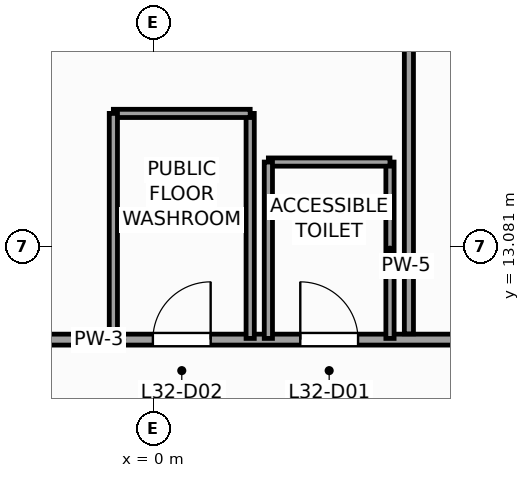
"""IFC4 building model, lengths in metres.
Left out: names, types, materials, properties, quantities, classifications, styles, units other than length and angle.
Written with IfcOpenShell. Run it as: python <this file> out.ifc"""

import sys

from ifc_helpers import new_model, si_unit, direction, frame, frame_2d, origin, place, context, subcontext, project, spatial, rectangle, extrude, source, transform, mapped, element, fill, save


model = new_model("IFC4")
c1 = context("Model", 3, precision=1e-05, world=origin(), true_north=direction((0.0, 1.0)))
c2 = subcontext(c1, "Body", "Model", "MODEL_VIEW")
j1 = project(units=[si_unit("LENGTHUNIT", "METRE"), si_unit("PLANEANGLEUNIT", "RADIAN")], contexts=[c1])
p1 = place(None, origin())
s1 = spatial("IfcSite", under=j1, at=p1, CompositionType="ELEMENT")
p2 = place(p1, origin())
s2 = spatial("IfcBuilding", under=s1, at=p2, CompositionType="ELEMENT")
p3 = place(p2, frame((0.0, 0.0, 135.2)))
s3 = spatial("IfcBuildingStorey", under=s2, at=p3, CompositionType="ELEMENT", Elevation=135.2)
p4 = place(p3, frame((-12.6, 11.55, 0.0), z_axis=(0.0, 0.0, 1.0), x_axis=(1.0, 0.0, 0.0)))
e1 = element("IfcWall", 1, at=p4, inside=s3, PredefinedType="PARTITIONING", context=c2, shape_type="SweptSolid", body=[
    extrude(rectangle(XDim=24.15, YDim=0.18, at=frame_2d((12.075, 0.0))), origin(), (0.0, 0.0, 1.0), 3.6),
])
p5 = place(p4, frame((15.014, 0.0, 0.0)))
e2 = element("IfcOpeningElement", 2, at=p5, cuts=e1, PredefinedType="OPENING", context=c2, shape_type="SweptSolid", body=[
    extrude(rectangle(XDim=0.95, YDim=2.1, at=frame_2d((0.475, 1.05))), frame((0.0, 0.1, 0.0), z_axis=(0.0, -1.0, 0.0), x_axis=(1.0, 0.0, 0.0)), (0.0, 0.0, 1.0), 0.2),
])
p6 = place(p4, frame((12.59, 0.0, 0.0)))
e3 = element("IfcOpeningElement", 3, at=p6, cuts=e1, PredefinedType="OPENING", context=c2, shape_type="SweptSolid", body=[
    extrude(rectangle(XDim=0.95, YDim=2.1, at=frame_2d((0.475, 1.05))), frame((0.0, 0.1, 0.0), z_axis=(0.0, -1.0, 0.0), x_axis=(1.0, 0.0, 0.0)), (0.0, 0.0, 1.0), 0.2),
])
p7 = place(p3, frame((4.2, 11.645, 0.0), z_axis=(0.0, 0.0, 1.0), x_axis=(0.0, 1.0, 0.0)))
e4 = element("IfcWall", 4, at=p7, inside=s3, PredefinedType="PARTITIONING", context=c2, shape_type="SweptSolid", body=[
    extrude(rectangle(XDim=17.805, YDim=0.15, at=frame_2d((8.902, 0.0))), origin(), (0.0, 0.0, 1.0), 3.6),
])
p8 = place(p3, frame((3.889, 11.57, 0.0), z_axis=(0.0, 0.0, 1.0), x_axis=(0.0, 1.0, 0.0)))
e5 = element("IfcWall", 5, at=p8, inside=s3, PredefinedType="PARTITIONING", context=c2, shape_type="SweptSolid", body=[
    extrude(rectangle(XDim=2.9, YDim=0.135, at=frame_2d((1.45, 0.0))), origin(), (0.0, 0.0, 1.0), 3.6),
])
p9 = place(p3, frame((1.889, 14.47, 0.0), z_axis=(0.0, 0.0, 1.0), x_axis=(1.0, 0.0, 0.0)))
e6 = element("IfcWall", 6, at=p9, inside=s3, PredefinedType="PARTITIONING", context=c2, shape_type="SweptSolid", body=[
    extrude(rectangle(XDim=2.0, YDim=0.135, at=frame_2d((1.0, 0.0))), origin(), (0.0, 0.0, 1.0), 3.6),
])
p10 = place(p3, frame((1.889, 11.57, 0.0), z_axis=(0.0, 0.0, 1.0), x_axis=(0.0, 1.0, 0.0)))
e7 = element("IfcWall", 7, at=p10, inside=s3, PredefinedType="PARTITIONING", context=c2, shape_type="SweptSolid", body=[
    extrude(rectangle(XDim=2.9, YDim=0.135, at=frame_2d((1.45, 0.0))), origin(), (0.0, 0.0, 1.0), 3.6),
])
p11 = place(p3, frame((1.59, 11.57, 0.0), z_axis=(0.0, 0.0, 1.0), x_axis=(0.0, 1.0, 0.0)))
e8 = element("IfcWall", 8, at=p11, inside=s3, PredefinedType="PARTITIONING", context=c2, shape_type="SweptSolid", body=[
    extrude(rectangle(XDim=3.7, YDim=0.135, at=frame_2d((1.85, 0.0))), origin(), (0.0, 0.0, 1.0), 3.6),
])
p12 = place(p3, frame((-0.66, 15.27, 0.0), z_axis=(0.0, 0.0, 1.0), x_axis=(1.0, 0.0, 0.0)))
e9 = element("IfcWall", 9, at=p12, inside=s3, PredefinedType="PARTITIONING", context=c2, shape_type="SweptSolid", body=[
    extrude(rectangle(XDim=2.25, YDim=0.135, at=frame_2d((1.125, 0.0))), origin(), (0.0, 0.0, 1.0), 3.6),
])
p13 = place(p3, frame((-0.66, 11.57, 0.0), z_axis=(0.0, 0.0, 1.0), x_axis=(0.0, 1.0, 0.0)))
e10 = element("IfcWall", 10, at=p13, inside=s3, PredefinedType="PARTITIONING", context=c2, shape_type="SweptSolid", body=[
    extrude(rectangle(XDim=3.7, YDim=0.135, at=frame_2d((1.85, 0.0))), origin(), (0.0, 0.0, 1.0), 3.6),
])
m1 = source(origin(), c2, "Body", "SweptSolid", [
    extrude(rectangle(XDim=0.95, YDim=2.1, at=frame_2d((0.475, 1.05))), frame((0.0, 0.025, 0.0), z_axis=(0.0, -1.0, 0.0), x_axis=(1.0, 0.0, 0.0)), (0.0, 0.0, 1.0), 0.05),
])
p14 = place(p5, origin())
e11 = element("IfcDoor", 11, at=p14, inside=s3, OperationType="SINGLE_SWING_LEFT", PredefinedType="DOOR", context=c2, shape_type="MappedRepresentation", body=[
    mapped(m1, transform((0.0, 0.0, 0.0), scale=1.0)),
])
fill(e2, e11)
p15 = place(p6, origin())
e12 = element("IfcDoor", 12, at=p15, inside=s3, OperationType="SINGLE_SWING_RIGHT", PredefinedType="DOOR", context=c2, shape_type="MappedRepresentation", body=[
    mapped(m1, transform((0.0, 0.0, 0.0), scale=1.0)),
])
fill(e3, e12)
save(model, sys.argv[1])
